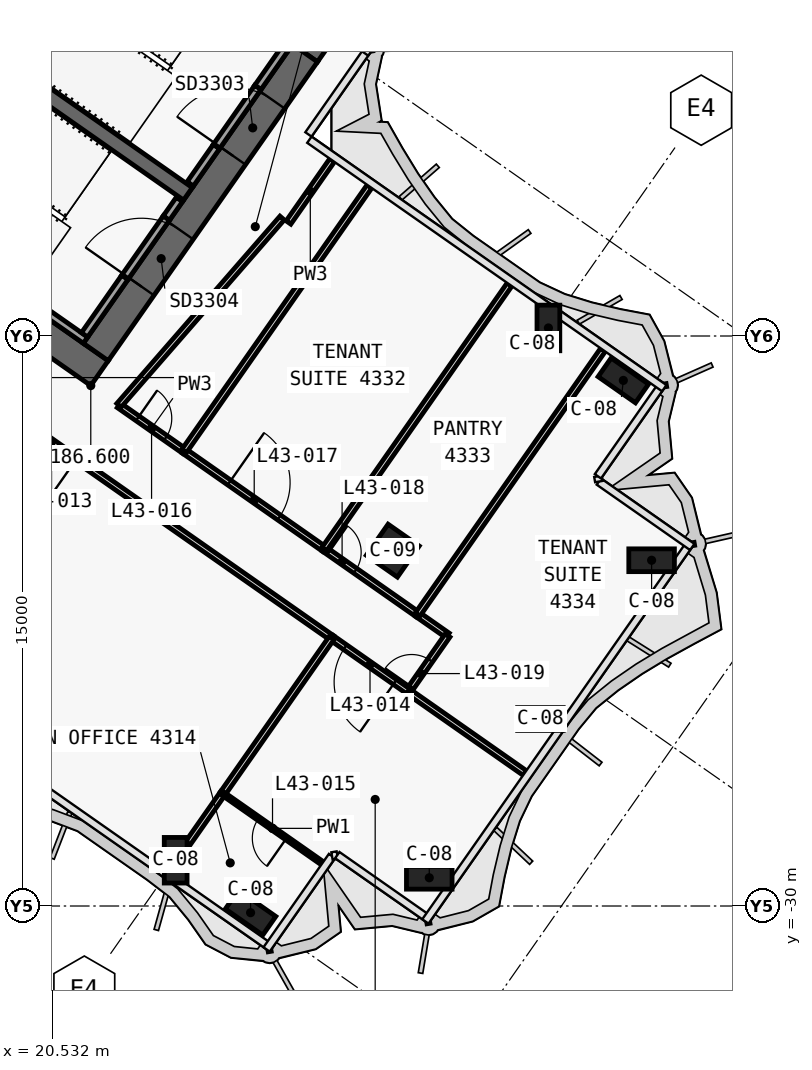
"""IFC4 building model, lengths in metres.
Left out: names, types, materials, properties, quantities, classifications, styles, units other than length and angle.
Written with IfcOpenShell. Run it as: python <this file> out.ifc"""

import sys

from ifc_helpers import new_model, si_unit, direction, frame, frame_2d, origin, origin_2d, place, context, subcontext, project, spatial, polyline, rectangle, outline, extrude, clip, halfspace, element, fill, save


model = new_model("IFC4")
c1 = context("Model", 3, precision=1e-05, world=origin(), true_north=direction((0.0, 1.0)))
c2 = subcontext(c1, "Body", "Model", "MODEL_VIEW")
j1 = project(units=[si_unit("LENGTHUNIT", "METRE"), si_unit("PLANEANGLEUNIT", "RADIAN")], contexts=[c1])
p1 = place(None, origin())
s1 = spatial("IfcSite", under=j1, at=p1, CompositionType="ELEMENT")
p2 = place(p1, origin())
s2 = spatial("IfcBuilding", under=s1, at=p2, CompositionType="ELEMENT")
p3 = place(p2, frame((0.0, 0.0, 186.6)))
s3 = spatial("IfcBuildingStorey", under=s2, at=p3, CompositionType="ELEMENT", Elevation=186.6)
p4 = place(p3, frame((-0.029, 11.984, 0.0), z_axis=(0.0, 0.0, 1.0), x_axis=(0.819151382952, -0.573577380837, 0.0)))
e1 = element("IfcWall", 1, at=p4, inside=s3, PredefinedType="SHEAR", context=c2, shape_type="SweptSolid", body=[
    extrude(outline(polyline([(33.898, 0.4), (-0.0, 0.4), (0.56, -0.4), (33.898, -0.4), (33.898, 0.4)])), origin(), (0.0, 0.0, 1.0), 3.9),
])
p5 = place(p3, frame((-0.029, -0.712, 0.0), z_axis=(0.0, 0.0, 1.0), x_axis=(0.819151758019, -0.573576845187, 0.0)))
e2 = element("IfcWall", 2, at=p5, inside=s3, PredefinedType="SHEAR", context=c2, shape_type="SweptSolid", body=[
    extrude(outline(polyline([(26.616, 0.4), (-0.0, 0.4), (0.56, -0.4), (26.616, -0.4), (26.616, 0.4)])), origin(), (0.0, 0.0, 1.0), 3.9),
])
p6 = place(p5, frame((1.166, 0.0, 0.0)))
e3 = element("IfcOpeningElement", 3, at=p6, cuts=e2, PredefinedType="OPENING", context=c2, shape_type="SweptSolid", body=[
    extrude(rectangle(XDim=1.5, YDim=2.1, at=frame_2d((0.75, 1.05))), frame((0.0, 0.41, 0.0), z_axis=(0.0, -1.0, 0.0), x_axis=(1.0, 0.0, 0.0)), (0.0, 0.0, 1.0), 0.82),
])
p7 = place(p5, frame((12.366, 0.0, 0.0)))
e4 = element("IfcOpeningElement", 4, at=p7, cuts=e2, PredefinedType="OPENING", context=c2, shape_type="SweptSolid", body=[
    extrude(rectangle(XDim=1.5, YDim=2.1, at=frame_2d((0.75, 1.05))), frame((0.0, 0.41, 0.0), z_axis=(0.0, -1.0, 0.0), x_axis=(1.0, 0.0, 0.0)), (0.0, 0.0, 1.0), 0.82),
])
p8 = place(p3, frame((21.675, -15.421, 0.0), z_axis=(0.0, 0.0, 1.0), x_axis=(0.573581815061, 0.819148278049, 0.0)))
e5 = element("IfcWall", 5, at=p8, inside=s3, PredefinedType="SHEAR", context=c2, shape_type="SweptSolid", body=[
    extrude(outline(polyline([(9.6, 0.4), (0.0, 0.4), (0.0, -0.4), (9.6, -0.4), (9.6, 0.4)])), origin(), (0.0, 0.0, 1.0), 3.9),
])
p9 = place(p8, frame((6.3, 0.0, 0.0)))
e6 = element("IfcOpeningElement", 6, at=p9, cuts=e5, PredefinedType="OPENING", context=c2, shape_type="SweptSolid", body=[
    extrude(rectangle(XDim=1.8, YDim=2.1, at=frame_2d((0.9, 1.05))), frame((0.0, 0.41, 0.0), z_axis=(0.0, -1.0, 0.0), x_axis=(1.0, 0.0, 0.0)), (0.0, 0.0, 1.0), 0.82),
])
p10 = place(p8, frame((2.1, 0.0, 0.0)))
e7 = element("IfcOpeningElement", 7, at=p10, cuts=e5, PredefinedType="OPENING", context=c2, shape_type="SweptSolid", body=[
    extrude(rectangle(XDim=1.8, YDim=2.1, at=frame_2d((0.9, 1.05))), frame((0.0, 0.41, 0.0), z_axis=(0.0, -1.0, 0.0), x_axis=(1.0, 0.0, 0.0)), (0.0, 0.0, 1.0), 0.82),
])
p11 = place(p3, frame((2.638, 3.768, 0.0), z_axis=(0.0, 0.0, 1.0), x_axis=(0.81915267502, -0.573575535572, 0.0)))
e8 = element("IfcWall", 8, at=p11, inside=s3, PredefinedType="SHEAR", context=c2, shape_type="SweptSolid", body=[
    extrude(outline(polyline([(0.0, 0.2), (0.0, -0.2), (26.2, -0.2), (26.2, 0.2), (0.0, 0.2)])), origin(), (0.0, 0.0, 1.0), 3.9),
])
p12 = place(p11, frame((9.637, 0.0, 0.0)))
e9 = element("IfcOpeningElement", 9, at=p12, cuts=e8, PredefinedType="OPENING", context=c2, shape_type="SweptSolid", body=[
    extrude(rectangle(XDim=1.2, YDim=2.1, at=frame_2d((0.6, 1.05))), frame((0.0, 0.21, 0.0), z_axis=(0.0, -1.0, 0.0), x_axis=(1.0, 0.0, 0.0)), (0.0, 0.0, 1.0), 0.42),
])
p13 = place(p11, frame((11.812, 0.0, 0.0)))
e10 = element("IfcOpeningElement", 10, at=p13, cuts=e8, PredefinedType="OPENING", context=c2, shape_type="SweptSolid", body=[
    extrude(rectangle(XDim=1.2, YDim=2.1, at=frame_2d((0.6, 1.05))), frame((0.0, 0.21, 0.0), z_axis=(0.0, -1.0, 0.0), x_axis=(1.0, 0.0, 0.0)), (0.0, 0.0, 1.0), 0.42),
])
p14 = place(p11, frame((13.988, 0.0, 0.0)))
e11 = element("IfcOpeningElement", 11, at=p14, cuts=e8, PredefinedType="OPENING", context=c2, shape_type="SweptSolid", body=[
    extrude(rectangle(XDim=1.2, YDim=2.1, at=frame_2d((0.6, 1.05))), frame((0.0, 0.21, 0.0), z_axis=(0.0, -1.0, 0.0), x_axis=(1.0, 0.0, 0.0)), (0.0, 0.0, 1.0), 0.42),
])
p15 = place(p11, frame((16.262, 0.0, 0.0)))
e12 = element("IfcOpeningElement", 12, at=p15, cuts=e8, PredefinedType="OPENING", context=c2, shape_type="SweptSolid", body=[
    extrude(rectangle(XDim=1.0, YDim=2.1, at=frame_2d((0.5, 1.05))), frame((0.0, 0.21, 0.0), z_axis=(0.0, -1.0, 0.0), x_axis=(1.0, 0.0, 0.0)), (0.0, 0.0, 1.0), 0.42),
])
p16 = place(p3, frame((23.782, -28.799, -0.0), z_axis=(-0.083515095002, 0.058505570787, 0.99478757888), x_axis=(0.814755419354, -0.570767845737, 0.101968980118)))
e13 = element("IfcColumn", 13, at=p16, inside=s3, PredefinedType="COLUMN", context=c2, shape_type="Clipping", body=[
    clip(clip(extrude(rectangle(XDim=1.2, YDim=0.6, at=origin_2d()), origin(), (0.0, 0.0, 1.0), 3.92), halfspace(frame((0.0, 0.0, 0.062), z_axis=(0.0, 0.0, 1.0), x_axis=(1.0, 0.0, 0.0)), True)), halfspace(frame((0.0, 0.0, 3.859), z_axis=(0.0, 0.0, 1.0), x_axis=(1.0, 0.0, 0.0)), False)),
])
p17 = place(p3, frame((25.748, -30.176, 0.0), z_axis=(0.0, 0.0, 1.0), x_axis=(0.819152044289, -0.573576436351, 0.0)))
e14 = element("IfcColumn", 14, at=p17, inside=s3, PredefinedType="COLUMN", context=c2, shape_type="SweptSolid", body=[
    extrude(rectangle(XDim=1.2, YDim=0.6, at=origin_2d()), origin(), (0.0, 0.0, 1.0), 3.62),
])
p18 = place(p3, frame((33.591, -14.792, -0.0), z_axis=(-0.083578937903, 0.058505256532, 0.994782235515), x_axis=(0.8149573613, -0.57047015291, 0.102021095381)))
e15 = element("IfcColumn", 15, at=p18, inside=s3, PredefinedType="COLUMN", context=c2, shape_type="Clipping", body=[
    clip(clip(extrude(rectangle(XDim=1.2, YDim=0.6, at=origin_2d()), origin(), (0.0, 0.0, 1.0), 3.92), halfspace(frame((0.0, 0.0, 0.062), z_axis=(0.0, 0.0, 1.0), x_axis=(1.0, 0.0, 0.0)), True)), halfspace(frame((0.0, 0.0, 3.859), z_axis=(0.0, 0.0, 1.0), x_axis=(1.0, 0.0, 0.0)), False)),
])
p19 = place(p3, frame((35.556, -16.168, 0.0), z_axis=(0.0, 0.0, 1.0), x_axis=(0.819152044289, -0.573576436351, 0.0)))
e16 = element("IfcColumn", 16, at=p19, inside=s3, PredefinedType="COLUMN", context=c2, shape_type="SweptSolid", body=[
    extrude(rectangle(XDim=1.2, YDim=0.6, at=origin_2d()), origin(), (0.0, 0.0, 1.0), 3.62),
])
p20 = place(p3, frame((30.553, -29.329, -0.0), z_axis=(-0.477747821975, 0.334512857575, 0.812316543421), x_axis=(0.573565197047, 0.819159914019, 0.0)))
e17 = element("IfcColumn", 17, at=p20, inside=s3, PredefinedType="COLUMN", context=c2, shape_type="Clipping", body=[
    clip(clip(extrude(rectangle(XDim=1.2, YDim=0.6, at=origin_2d()), origin(), (0.0, 0.0, 1.0), 4.801), halfspace(frame((0.0, 0.0, 0.215), z_axis=(0.0, 0.0, 1.0), x_axis=(1.0, 0.0, 0.0)), True)), halfspace(frame((0.0, 0.0, 4.586), z_axis=(0.0, 0.0, 1.0), x_axis=(1.0, 0.0, 0.0)), False)),
])
p21 = place(p3, frame((33.478, -25.151, -0.0), z_axis=(-0.477704706914, 0.334521785172, 0.812338222809), x_axis=(0.573610203854, 0.819128398991, 0.0)))
e18 = element("IfcColumn", 18, at=p21, inside=s3, PredefinedType="COLUMN", context=c2, shape_type="Clipping", body=[
    clip(clip(extrude(rectangle(XDim=1.2, YDim=0.6, at=origin_2d()), origin(), (0.0, 0.0, 1.0), 4.801), halfspace(frame((0.0, 0.0, 0.215), z_axis=(0.0, 0.0, 1.0), x_axis=(1.0, 0.0, 0.0)), True)), halfspace(frame((0.0, 0.0, 4.585), z_axis=(0.0, 0.0, 1.0), x_axis=(1.0, 0.0, 0.0)), False)),
])
p22 = place(p3, frame((36.404, -20.973, -0.0), z_axis=(-0.477738893719, 0.334562468952, 0.812301362671), x_axis=(0.573629466203, 0.819114909829, 0.0)))
e19 = element("IfcColumn", 19, at=p22, inside=s3, PredefinedType="COLUMN", context=c2, shape_type="Clipping", body=[
    clip(clip(extrude(rectangle(XDim=1.2, YDim=0.6, at=origin_2d()), origin(), (0.0, 0.0, 1.0), 4.801), halfspace(frame((0.0, 0.0, 0.215), z_axis=(0.0, 0.0, 1.0), x_axis=(1.0, 0.0, 0.0)), True)), halfspace(frame((0.0, 0.0, 4.586), z_axis=(0.0, 0.0, 1.0), x_axis=(1.0, 0.0, 0.0)), False)),
])
p23 = place(p3, frame((29.49, -20.649, 0.0), z_axis=(0.0, 0.0, 1.0), x_axis=(0.819152044289, -0.573576436351, 0.0)))
e20 = element("IfcColumn", 20, at=p23, inside=s3, PredefinedType="COLUMN", context=c2, shape_type="SweptSolid", body=[
    extrude(rectangle(XDim=1.0, YDim=1.0, at=origin_2d()), origin(), (0.0, 0.0, 1.0), 3.62),
])
p24 = place(p3, frame((24.162, -10.998, 0.0), z_axis=(0.0, 0.0, 1.0), x_axis=(0.573612502218, 0.819126789514, 0.0)))
e21 = element("IfcWall", 21, at=p24, inside=s3, PredefinedType="SOLIDWALL", context=c2, shape_type="SweptSolid", body=[
    extrude(rectangle(XDim=1.2, YDim=0.2, at=frame_2d((0.6, 0.0))), origin(), (0.0, 0.0, 1.0), 3.62),
])
p25 = place(p3, frame((25.94, -8.458, 0.0), z_axis=(0.0, 0.0, 1.0), x_axis=(0.573619628835, 0.819121798889, 0.0)))
e22 = element("IfcWall", 22, at=p25, inside=s3, PredefinedType="SOLIDWALL", context=c2, shape_type="SweptSolid", body=[
    extrude(rectangle(XDim=1.25, YDim=0.2, at=frame_2d((0.625, 0.0))), origin(), (0.0, 0.0, 1.0), 3.62),
])
p26 = place(p3, frame((24.85, -10.014, 2.15), z_axis=(0.0, 0.0, 1.0), x_axis=(0.573505465124, 0.819201734296, 0.0)))
e23 = element("IfcWall", 23, at=p26, inside=s3, PredefinedType="SOLIDWALL", context=c2, shape_type="SweptSolid", body=[
    extrude(rectangle(XDim=1.9, YDim=0.2, at=frame_2d((0.95, 0.0))), origin(), (0.0, 0.0, 1.0), 1.47),
])
p27 = place(p3, frame((14.851, -10.521, 0.0), z_axis=(0.0, 0.0, 1.0), x_axis=(0.819141584393, -0.57359137434, 0.0)))
e24 = element("IfcWall", 24, at=p27, inside=s3, PredefinedType="SOLIDWALL", context=c2, shape_type="SweptSolid", body=[
    extrude(rectangle(XDim=8.0, YDim=0.2, at=frame_2d((4.0, 0.0))), origin(), (0.0, 0.0, 1.0), 3.62),
])
p28 = place(p3, frame((21.38, -14.97, 0.0), z_axis=(0.0, 0.0, 1.0), x_axis=(0.573559770908, 0.819163713305, 0.0)))
e25 = element("IfcWall", 25, at=p28, inside=s3, PredefinedType="SOLIDWALL", context=c2, shape_type="SweptSolid", body=[
    extrude(rectangle(XDim=1.85, YDim=0.2, at=frame_2d((0.925, 0.0))), origin(), (0.0, 0.0, 1.0), 3.62),
])
p29 = place(p3, frame((23.531, -11.898, 0.0), z_axis=(0.0, 0.0, 1.0), x_axis=(0.573708088123, 0.819059844958, 0.0)))
e26 = element("IfcWall", 26, at=p29, inside=s3, PredefinedType="SOLIDWALL", context=c2, shape_type="SweptSolid", body=[
    extrude(rectangle(XDim=0.6, YDim=0.2, at=frame_2d((0.3, 0.0))), origin(), (0.0, 0.0, 1.0), 3.62),
])
p30 = place(p3, frame((22.441, -13.455, 2.15), z_axis=(0.0, 0.0, 1.0), x_axis=(0.573591692345, 0.819141361715, 0.0)))
e27 = element("IfcWall", 27, at=p30, inside=s3, PredefinedType="SOLIDWALL", context=c2, shape_type="SweptSolid", body=[
    extrude(rectangle(XDim=1.9, YDim=0.2, at=frame_2d((0.95, 0.0))), origin(), (0.0, 0.0, 1.0), 1.47),
])
p31 = place(p3, frame((22.283, -16.824, 0.0), z_axis=(0.0, 0.0, 1.0), x_axis=(0.819182738768, -0.573532597595, 0.0)))
e28 = element("IfcWall", 28, at=p31, inside=s3, PredefinedType="PARTITIONING", context=c2, shape_type="SweptSolid", body=[
    extrude(rectangle(XDim=2.099, YDim=0.15, at=frame_2d((1.05, 0.0))), origin(), (0.0, 0.0, 1.0), 3.62),
])
p32 = place(p31, frame((0.6, 0.0, 0.0)))
e29 = element("IfcOpeningElement", 29, at=p32, cuts=e28, PredefinedType="OPENING", context=c2, shape_type="SweptSolid", body=[
    extrude(rectangle(XDim=0.9, YDim=2.1, at=frame_2d((0.45, 1.05))), frame((0.0, 0.085, 0.0), z_axis=(0.0, -1.0, 0.0), x_axis=(1.0, 0.0, 0.0)), (0.0, 0.0, 1.0), 0.17),
])
p33 = place(p3, frame((23.999, -18.025, 0.0), z_axis=(0.0, 0.0, 1.0), x_axis=(0.819165703328, -0.573556928727, 0.0)))
e30 = element("IfcWall", 30, at=p33, inside=s3, PredefinedType="PARTITIONING", context=c2, shape_type="SweptSolid", body=[
    extrude(rectangle(XDim=4.504, YDim=0.15, at=frame_2d((2.252, 0.0))), origin(), (0.0, 0.0, 1.0), 3.62),
])
p34 = place(p33, frame((1.452, 0.0, 0.0)))
e31 = element("IfcOpeningElement", 31, at=p34, cuts=e30, PredefinedType="OPENING", context=c2, shape_type="SweptSolid", body=[
    extrude(rectangle(XDim=1.6, YDim=2.1, at=frame_2d((0.8, 1.05))), frame((0.0, 0.085, 0.0), z_axis=(0.0, -1.0, 0.0), x_axis=(1.0, 0.0, 0.0)), (0.0, 0.0, 1.0), 0.17),
])
p35 = place(p3, frame((27.686, -20.606, 0.0), z_axis=(0.0, 0.0, 1.0), x_axis=(0.81916700466, -0.573555070134, 0.0)))
e32 = element("IfcWall", 32, at=p35, inside=s3, PredefinedType="PARTITIONING", context=c2, shape_type="SweptSolid", body=[
    extrude(rectangle(XDim=3.004, YDim=0.15, at=frame_2d((1.502, 0.0))), origin(), (0.0, 0.0, 1.0), 3.0),
])
p36 = place(p35, frame((0.15, 0.0, 0.0)))
e33 = element("IfcOpeningElement", 33, at=p36, cuts=e32, PredefinedType="OPENING", context=c2, shape_type="SweptSolid", body=[
    extrude(rectangle(XDim=0.85, YDim=2.1, at=frame_2d((0.425, 1.05))), frame((0.0, 0.085, 0.0), z_axis=(0.0, -1.0, 0.0), x_axis=(1.0, 0.0, 0.0)), (0.0, 0.0, 1.0), 0.17),
])
p37 = place(p3, frame((30.143, -22.327, 0.0), z_axis=(0.0, 0.0, 1.0), x_axis=(0.819089109609, -0.573666305895, 0.0)))
e34 = element("IfcWall", 34, at=p37, inside=s3, PredefinedType="PARTITIONING", context=c2, shape_type="SweptSolid", body=[
    extrude(rectangle(XDim=0.964, YDim=0.15, at=frame_2d((0.482, 0.0))), origin(), (0.0, 0.0, 1.0), 3.62),
])
p38 = place(p3, frame((29.9, -24.354, 0.0), z_axis=(0.0, 0.0, 1.0), x_axis=(0.57352607058, 0.819187308474, 0.0)))
e35 = element("IfcWall", 35, at=p38, inside=s3, PredefinedType="PARTITIONING", context=c2, shape_type="SweptSolid", body=[
    extrude(rectangle(XDim=1.8, YDim=0.15, at=frame_2d((0.9, 0.0))), origin(), (0.0, 0.0, 1.0), 3.0),
])
p39 = place(p38, frame((0.15, 0.0, 0.0)))
e36 = element("IfcOpeningElement", 36, at=p39, cuts=e35, PredefinedType="OPENING", context=c2, shape_type="SweptSolid", body=[
    extrude(rectangle(XDim=0.85, YDim=2.1, at=frame_2d((0.425, 1.05))), frame((0.0, 0.085, 0.0), z_axis=(0.0, -1.0, 0.0), x_axis=(1.0, 0.0, 0.0)), (0.0, 0.0, 1.0), 0.17),
])
p40 = place(p3, frame((27.885, -22.944, 0.0), z_axis=(0.0, 0.0, 1.0), x_axis=(-0.81914845568, 0.573581561381, 0.0)))
e37 = element("IfcWall", 37, at=p40, inside=s3, PredefinedType="PARTITIONING", context=c2, shape_type="SweptSolid", body=[
    extrude(rectangle(XDim=18.004, YDim=0.15, at=frame_2d((9.002, 0.0))), origin(), (0.0, 0.0, 1.0), 3.0),
])
p41 = place(p40, frame((8.202, 0.0, 0.0)))
e38 = element("IfcOpeningElement", 38, at=p41, cuts=e37, PredefinedType="OPENING", context=c2, shape_type="SweptSolid", body=[
    extrude(rectangle(XDim=1.6, YDim=2.1, at=frame_2d((0.8, 1.05))), frame((0.0, 0.085, 0.0), z_axis=(0.0, -1.0, 0.0), x_axis=(1.0, 0.0, 0.0)), (0.0, 0.0, 1.0), 0.17),
])
p42 = place(p3, frame((29.9, -24.354, 0.0), z_axis=(0.0, 0.0, 1.0), x_axis=(-0.819166750642, 0.57355543293, 0.0)))
e39 = element("IfcWall", 39, at=p42, inside=s3, PredefinedType="PARTITIONING", context=c2, shape_type="SweptSolid", body=[
    extrude(rectangle(XDim=2.464, YDim=0.15, at=frame_2d((1.232, 0.0))), origin(), (0.0, 0.0, 1.0), 3.62),
])
p43 = place(p42, frame((0.432, 0.0, 0.0)))
e40 = element("IfcOpeningElement", 40, at=p43, cuts=e39, PredefinedType="OPENING", context=c2, shape_type="SweptSolid", body=[
    extrude(rectangle(XDim=1.6, YDim=2.1, at=frame_2d((0.8, 1.05))), frame((0.0, 0.085, 0.0), z_axis=(0.0, -1.0, 0.0), x_axis=(1.0, 0.0, 0.0)), (0.0, 0.0, 1.0), 0.17),
])
p44 = place(p3, frame((28.876, -11.064, 0.0), z_axis=(0.0, 0.0, 1.0), x_axis=(-0.573591492816, -0.819141501433, 0.0)))
e41 = element("IfcWall", 41, at=p44, inside=s3, PredefinedType="PARTITIONING", context=c2, shape_type="SweptSolid", body=[
    extrude(rectangle(XDim=8.5, YDim=0.15, at=frame_2d((4.25, 0.0))), origin(), (0.0, 0.0, 1.0), 3.0),
])
p45 = place(p3, frame((22.285, -16.825, 0.0), z_axis=(0.0, 0.0, 1.0), x_axis=(0.656781429942, 0.754080999153, 0.0)))
e42 = element("IfcWall", 42, at=p45, inside=s3, PredefinedType="PARTITIONING", context=c2, shape_type="SweptSolid", body=[
    extrude(rectangle(XDim=6.536, YDim=0.15, at=frame_2d((3.268, 0.0))), origin(), (0.0, 0.0, 1.0), 3.62),
])
p46 = place(p3, frame((26.746, -12.014, 0.0), z_axis=(0.0, 0.0, 1.0), x_axis=(0.573568836472, 0.819157365729, 0.0)))
e43 = element("IfcWall", 43, at=p46, inside=s3, PredefinedType="PARTITIONING", context=c2, shape_type="SweptSolid", body=[
    extrude(rectangle(XDim=2.0, YDim=0.15, at=frame_2d((1.0, 0.0))), origin(), (0.0, 0.0, 1.0), 3.0),
])
p47 = place(p3, frame((32.562, -13.645, 0.0), z_axis=(0.0, 0.0, 1.0), x_axis=(-0.573572219642, -0.819154996844, 0.0)))
e44 = element("IfcWall", 44, at=p47, inside=s3, PredefinedType="PARTITIONING", context=c2, shape_type="SweptSolid", body=[
    extrude(rectangle(XDim=8.5, YDim=0.15, at=frame_2d((4.25, 0.0))), origin(), (0.0, 0.0, 1.0), 3.0),
])
p48 = place(p3, frame((35.02, -15.365, 0.0), z_axis=(0.0, 0.0, 1.0), x_axis=(-0.57357799764, -0.819150951061, 0.0)))
e45 = element("IfcWall", 45, at=p48, inside=s3, PredefinedType="PARTITIONING", context=c2, shape_type="SweptSolid", body=[
    extrude(rectangle(XDim=8.5, YDim=0.15, at=frame_2d((4.25, 0.0))), origin(), (0.0, 0.0, 1.0), 2.9),
])
p49 = place(p3, frame((32.962, -26.499, 0.0), z_axis=(0.0, 0.0, 1.0), x_axis=(-0.819149046121, 0.573580718155, 0.0)))
e46 = element("IfcWall", 46, at=p49, inside=s3, PredefinedType="PARTITIONING", context=c2, shape_type="SweptSolid", body=[
    extrude(rectangle(XDim=3.737, YDim=0.15, at=frame_2d((1.869, 0.0))), origin(), (0.0, 0.0, 1.0), 2.9),
])
p50 = place(p3, frame((25.016, -27.037, 0.0), z_axis=(0.0, 0.0, 1.0), x_axis=(-0.573615752353, -0.819124513522, 0.0)))
e47 = element("IfcWall", 47, at=p50, inside=s3, PredefinedType="PARTITIONING", context=c2, shape_type="SweptSolid", body=[
    extrude(rectangle(XDim=1.602, YDim=0.15, at=frame_2d((0.801, 0.0))), origin(), (0.0, 0.0, 1.0), 2.9),
])
p51 = place(p3, frame((27.884, -22.942, 0.0), z_axis=(0.0, 0.0, 1.0), x_axis=(-0.573590089534, -0.819142484058, 0.0)))
e48 = element("IfcWall", 48, at=p51, inside=s3, PredefinedType="PARTITIONING", context=c2, shape_type="SweptSolid", body=[
    extrude(rectangle(XDim=5.002, YDim=0.15, at=frame_2d((2.501, 0.0))), origin(), (0.0, 0.0, 1.0), 3.62),
])
p52 = place(p3, frame((27.636, -28.875, 0.0), z_axis=(0.0, 0.0, 1.0), x_axis=(-0.819156644649, 0.573569866301, 0.0)))
e49 = element("IfcWall", 49, at=p52, inside=s3, PredefinedType="PARTITIONING", context=c2, shape_type="SweptSolid", body=[
    extrude(rectangle(XDim=3.2, YDim=0.1, at=frame_2d((1.6, 0.0))), origin(), (0.0, 0.0, 1.0), 2.9),
])
p53 = place(p52, frame((1.15, 0.0, 0.0)))
e50 = element("IfcOpeningElement", 50, at=p53, cuts=e49, PredefinedType="OPENING", context=c2, shape_type="SweptSolid", body=[
    extrude(rectangle(XDim=0.9, YDim=2.1, at=frame_2d((0.45, 1.05))), frame((0.0, 0.06, 0.0), z_axis=(0.0, -1.0, 0.0), x_axis=(1.0, 0.0, 0.0)), (0.0, 0.0, 1.0), 0.12),
])
p54 = place(p9, origin())
e51 = element("IfcDoor", 51, at=p54, inside=s3, OperationType="DOUBLE_DOOR_SINGLE_SWING", PredefinedType="DOOR", context=c2, shape_type="SweptSolid", body=[
    extrude(rectangle(XDim=1.8, YDim=2.1, at=frame_2d((0.9, 1.05))), frame((0.0, 0.025, 0.0), z_axis=(0.0, -1.0, 0.0), x_axis=(1.0, 0.0, 0.0)), (0.0, 0.0, 1.0), 0.05),
])
fill(e6, e51)
p55 = place(p10, origin())
e52 = element("IfcDoor", 52, at=p55, inside=s3, OperationType="DOUBLE_DOOR_SINGLE_SWING", PredefinedType="DOOR", context=c2, shape_type="SweptSolid", body=[
    extrude(rectangle(XDim=1.8, YDim=2.1, at=frame_2d((0.9, 1.05))), frame((0.0, 0.025, 0.0), z_axis=(0.0, -1.0, 0.0), x_axis=(1.0, 0.0, 0.0)), (0.0, 0.0, 1.0), 0.05),
])
fill(e7, e52)
p56 = place(p41, origin())
e53 = element("IfcDoor", 53, at=p56, inside=s3, OperationType="DOUBLE_DOOR_SINGLE_SWING", PredefinedType="DOOR", context=c2, shape_type="SweptSolid", body=[
    extrude(rectangle(XDim=1.6, YDim=2.1, at=frame_2d((0.8, 1.05))), frame((0.0, 0.025, 0.0), z_axis=(0.0, -1.0, 0.0), x_axis=(1.0, 0.0, 0.0)), (0.0, 0.0, 1.0), 0.05),
])
fill(e38, e53)
p57 = place(p43, origin())
e54 = element("IfcDoor", 54, at=p57, inside=s3, OperationType="DOUBLE_DOOR_SINGLE_SWING", PredefinedType="DOOR", context=c2, shape_type="SweptSolid", body=[
    extrude(rectangle(XDim=1.6, YDim=2.1, at=frame_2d((0.8, 1.05))), frame((0.0, 0.025, 0.0), z_axis=(0.0, -1.0, 0.0), x_axis=(1.0, 0.0, 0.0)), (0.0, 0.0, 1.0), 0.05),
])
fill(e40, e54)
p58 = place(p53, origin())
e55 = element("IfcDoor", 55, at=p58, inside=s3, OperationType="SINGLE_SWING_LEFT", PredefinedType="DOOR", context=c2, shape_type="SweptSolid", body=[
    extrude(rectangle(XDim=0.9, YDim=2.1, at=frame_2d((0.45, 1.05))), frame((0.0, 0.025, 0.0), z_axis=(0.0, -1.0, 0.0), x_axis=(1.0, 0.0, 0.0)), (0.0, 0.0, 1.0), 0.05),
])
fill(e50, e55)
p59 = place(p32, origin())
e56 = element("IfcDoor", 56, at=p59, inside=s3, OperationType="SINGLE_SWING_RIGHT", PredefinedType="DOOR", context=c2, shape_type="SweptSolid", body=[
    extrude(rectangle(XDim=0.9, YDim=2.1, at=frame_2d((0.45, 1.05))), frame((0.0, 0.025, 0.0), z_axis=(0.0, -1.0, 0.0), x_axis=(1.0, 0.0, 0.0)), (0.0, 0.0, 1.0), 0.05),
])
fill(e29, e56)
p60 = place(p34, origin())
e57 = element("IfcDoor", 57, at=p60, inside=s3, OperationType="DOUBLE_DOOR_SINGLE_SWING", PredefinedType="DOOR", context=c2, shape_type="SweptSolid", body=[
    extrude(rectangle(XDim=1.6, YDim=2.1, at=frame_2d((0.8, 1.05))), frame((0.0, 0.025, 0.0), z_axis=(0.0, -1.0, 0.0), x_axis=(1.0, 0.0, 0.0)), (0.0, 0.0, 1.0), 0.05),
])
fill(e31, e57)
p61 = place(p36, origin())
e58 = element("IfcDoor", 58, at=p61, inside=s3, OperationType="SINGLE_SWING_RIGHT", PredefinedType="DOOR", context=c2, shape_type="SweptSolid", body=[
    extrude(rectangle(XDim=0.85, YDim=2.1, at=frame_2d((0.425, 1.05))), frame((0.0, 0.025, 0.0), z_axis=(0.0, -1.0, 0.0), x_axis=(1.0, 0.0, 0.0)), (0.0, 0.0, 1.0), 0.05),
])
fill(e33, e58)
p62 = place(p39, origin())
e59 = element("IfcDoor", 59, at=p62, inside=s3, OperationType="SINGLE_SWING_RIGHT", PredefinedType="DOOR", context=c2, shape_type="SweptSolid", body=[
    extrude(rectangle(XDim=0.85, YDim=2.1, at=frame_2d((0.425, 1.05))), frame((0.0, 0.025, 0.0), z_axis=(0.0, -1.0, 0.0), x_axis=(1.0, 0.0, 0.0)), (0.0, 0.0, 1.0), 0.05),
])
fill(e36, e59)
save(model, sys.argv[1])
